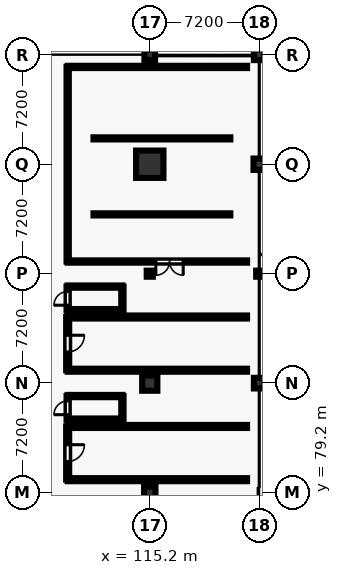
"""IFC4 building model, lengths in metres.
Left out: names, types, materials, properties, quantities, classifications, styles, units other than length and angle.
Written with IfcOpenShell. Run it as: python <this file> out.ifc"""

import sys

from ifc_helpers import new_model, si_unit, direction, frame, frame_2d, origin, origin_2d, place, context, subcontext, project, spatial, rectangle, hollow_rectangle, circle, extrude, element, fill, save


model = new_model("IFC4")
c1 = context("Model", 3, precision=1e-05, world=origin(), true_north=direction((0.0, 1.0)))
c2 = subcontext(c1, "Body", "Model", "MODEL_VIEW")
j1 = project(units=[si_unit("LENGTHUNIT", "METRE"), si_unit("PLANEANGLEUNIT", "RADIAN")], contexts=[c1])
p1 = place(None, origin())
s1 = spatial("IfcSite", under=j1, at=p1, CompositionType="ELEMENT")
p2 = place(p1, origin())
s2 = spatial("IfcBuilding", under=s1, at=p2, CompositionType="ELEMENT")
p3 = place(p2, frame((0.0, 0.0, 9.6)))
s3 = spatial("IfcBuildingStorey", under=s2, at=p3, CompositionType="ELEMENT", Elevation=9.6)
p4 = place(p3, frame((115.2, 79.2, 0.0), z_axis=(0.0, 0.0, 1.0), x_axis=(1.0, 0.0, 0.0)))
e1 = element("IfcColumn", 1, at=p4, inside=s3, PredefinedType="COLUMN", context=c2, shape_type="SweptSolid", body=[
    extrude(rectangle(XDim=0.75, YDim=0.75, at=origin_2d()), origin(), (0.0, 0.0, 1.0), 4.2),
])
p5 = place(p3, frame((115.2, 86.4, 0.0), z_axis=(0.0, 0.0, 1.0), x_axis=(1.0, 0.0, 0.0)))
e2 = element("IfcColumn", 2, at=p5, inside=s3, PredefinedType="COLUMN", context=c2, shape_type="SweptSolid", body=[
    extrude(circle(Radius=0.5, at=origin_2d()), origin(), (0.0, 0.0, 1.0), 4.2),
])
p6 = place(p3, frame((115.2, 93.6, 0.0), z_axis=(0.0, 0.0, 1.0), x_axis=(1.0, 0.0, 0.0)))
e3 = element("IfcColumn", 3, at=p6, inside=s3, PredefinedType="COLUMN", context=c2, shape_type="SweptSolid", body=[
    extrude(hollow_rectangle(XDim=0.4, YDim=0.4, WallThickness=0.02, at=origin_2d()), origin(), (0.0, 0.0, 1.0), 4.2),
])
p7 = place(p3, frame((115.2, 100.8, 0.0), z_axis=(0.0, 0.0, 1.0), x_axis=(1.0, 0.0, 0.0)))
e4 = element("IfcColumn", 4, at=p7, inside=s3, PredefinedType="COLUMN", context=c2, shape_type="SweptSolid", body=[
    extrude(circle(Radius=0.9, at=origin_2d()), origin(), (0.0, 0.0, 1.0), 4.2),
])
for number, where, z_axis, x_axis in (
    (5, (115.2, 108.0, 0.0), (0.0, 0.0, 1.0), (1.0, 0.0, 0.0)),
    (6, (122.4, 86.4, 0.0), (0.0, 0.0, 1.0), (1.0, 0.0, 0.0)),
):
    element("IfcColumn", number, at=place(p3, frame(where, z_axis=z_axis, x_axis=x_axis)), inside=s3, PredefinedType="COLUMN", context=c2, shape_type="SweptSolid", body=[
        extrude(rectangle(XDim=0.7, YDim=0.7, at=origin_2d()), origin(), (0.0, 0.0, 1.0), 4.2),
    ])
p8 = place(p3, frame((122.4, 93.6, 0.0), z_axis=(0.0, 0.0, 1.0), x_axis=(1.0, 0.0, 0.0)))
e7 = element("IfcColumn", 7, at=p8, inside=s3, PredefinedType="COLUMN", context=c2, shape_type="SweptSolid", body=[
    extrude(hollow_rectangle(XDim=0.4, YDim=0.4, WallThickness=0.02, at=origin_2d()), origin(), (0.0, 0.0, 1.0), 4.2),
])
p9 = place(p3, frame((122.4, 100.8, 0.0), z_axis=(0.0, 0.0, 1.0), x_axis=(1.0, 0.0, 0.0)))
e8 = element("IfcColumn", 8, at=p9, inside=s3, PredefinedType="COLUMN", context=c2, shape_type="SweptSolid", body=[
    extrude(rectangle(XDim=0.75, YDim=0.75, at=origin_2d()), origin(), (0.0, 0.0, 1.0), 4.2),
])
p10 = place(p3, frame((122.4, 108.0, 0.0), z_axis=(0.0, 0.0, 1.0), x_axis=(1.0, 0.0, 0.0)))
e9 = element("IfcColumn", 9, at=p10, inside=s3, PredefinedType="COLUMN", context=c2, shape_type="SweptSolid", body=[
    extrude(rectangle(XDim=0.7, YDim=0.7, at=origin_2d()), origin(), (0.0, 0.0, 1.0), 4.2),
])
p11 = place(p3, frame((109.8, 94.4, 0.0), z_axis=(0.0, 0.0, 1.0), x_axis=(1.0, 0.0, 0.0)))
e10 = element("IfcWall", 10, at=p11, inside=s3, PredefinedType="PARTITIONING", context=c2, shape_type="SweptSolid", body=[
    extrude(rectangle(XDim=11.8, YDim=0.15, at=frame_2d((5.9, 0.0))), origin(), (0.0, 0.0, 1.0), 2.94),
])
p12 = place(p11, frame((5.8, 0.0, 0.0)))
e11 = element("IfcOpeningElement", 11, at=p12, cuts=e10, PredefinedType="OPENING", context=c2, shape_type="SweptSolid", body=[
    extrude(rectangle(XDim=1.8, YDim=2.3, at=frame_2d((0.9, 1.15))), frame((0.0, 0.085, 0.0), z_axis=(0.0, -1.0, 0.0), x_axis=(1.0, 0.0, 0.0)), (0.0, 0.0, 1.0), 0.17),
])
p13 = place(p3, frame((121.6, 107.2, 0.0), z_axis=(0.0, 0.0, 1.0), x_axis=(-1.0, 0.0, 0.0)))
e12 = element("IfcWall", 12, at=p13, inside=s3, PredefinedType="PARTITIONING", context=c2, shape_type="SweptSolid", body=[
    extrude(rectangle(XDim=11.8, YDim=0.15, at=frame_2d((5.9, 0.0))), origin(), (0.0, 0.0, 1.0), 2.94),
])
p14 = place(p3, frame((109.8, 107.2, 0.0), z_axis=(0.0, 0.0, 1.0), x_axis=(0.0, -1.0, 0.0)))
e13 = element("IfcWall", 13, at=p14, inside=s3, PredefinedType="PARTITIONING", context=c2, shape_type="SweptSolid", body=[
    extrude(rectangle(XDim=12.8, YDim=0.15, at=frame_2d((6.4, 0.0))), origin(), (0.0, 0.0, 1.0), 2.94),
])
for number, where, z_axis, x_axis in (
    (14, (109.8, 80.05, 0.0), (0.0, 0.0, 1.0), (1.0, 0.0, 0.0)),
    (15, (121.6, 83.55, 0.0), (0.0, 0.0, 1.0), (-1.0, 0.0, 0.0)),
):
    element("IfcWall", number, at=place(p3, frame(where, z_axis=z_axis, x_axis=x_axis)), inside=s3, PredefinedType="PARTITIONING", context=c2, shape_type="SweptSolid", body=[
        extrude(rectangle(XDim=11.8, YDim=0.2, at=frame_2d((5.9, 0.0))), origin(), (0.0, 0.0, 1.0), 2.94),
    ])
p15 = place(p3, frame((109.8, 83.55, 0.0), z_axis=(0.0, 0.0, 1.0), x_axis=(0.0, -1.0, 0.0)))
e16 = element("IfcWall", 16, at=p15, inside=s3, PredefinedType="PARTITIONING", context=c2, shape_type="SweptSolid", body=[
    extrude(rectangle(XDim=3.5, YDim=0.2, at=frame_2d((1.75, 0.0))), origin(), (0.0, 0.0, 1.0), 2.94),
])
p16 = place(p15, frame((1.2, 0.0, 0.0)))
e17 = element("IfcOpeningElement", 17, at=p16, cuts=e16, PredefinedType="OPENING", context=c2, shape_type="SweptSolid", body=[
    extrude(rectangle(XDim=1.1, YDim=2.25, at=frame_2d((0.55, 1.125))), frame((0.0, 0.11, 0.0), z_axis=(0.0, -1.0, 0.0), x_axis=(1.0, 0.0, 0.0)), (0.0, 0.0, 1.0), 0.22),
])
p17 = place(p3, frame((109.8, 84.0, 0.0), z_axis=(0.0, 0.0, 1.0), x_axis=(1.0, 0.0, 0.0)))
e18 = element("IfcWall", 18, at=p17, inside=s3, PredefinedType="PARTITIONING", context=c2, shape_type="SweptSolid", body=[
    extrude(rectangle(XDim=3.6, YDim=0.15, at=frame_2d((1.8, 0.0))), origin(), (0.0, 0.0, 1.0), 2.94),
])
p18 = place(p3, frame((113.4, 84.0, 0.0), z_axis=(0.0, 0.0, 1.0), x_axis=(0.0, 1.0, 0.0)))
e19 = element("IfcWall", 19, at=p18, inside=s3, PredefinedType="PARTITIONING", context=c2, shape_type="SweptSolid", body=[
    extrude(rectangle(XDim=1.55, YDim=0.15, at=frame_2d((0.775, 0.0))), origin(), (0.0, 0.0, 1.0), 2.94),
])
p19 = place(p3, frame((113.4, 85.55, 0.0), z_axis=(0.0, 0.0, 1.0), x_axis=(-1.0, 0.0, 0.0)))
e20 = element("IfcWall", 20, at=p19, inside=s3, PredefinedType="PARTITIONING", context=c2, shape_type="SweptSolid", body=[
    extrude(rectangle(XDim=3.6, YDim=0.15, at=frame_2d((1.8, 0.0))), origin(), (0.0, 0.0, 1.0), 2.94),
])
p20 = place(p3, frame((109.8, 85.55, 0.0), z_axis=(0.0, 0.0, 1.0), x_axis=(0.0, -1.0, 0.0)))
e21 = element("IfcWall", 21, at=p20, inside=s3, PredefinedType="PARTITIONING", context=c2, shape_type="SweptSolid", body=[
    extrude(rectangle(XDim=1.55, YDim=0.15, at=frame_2d((0.775, 0.0))), origin(), (0.0, 0.0, 1.0), 2.94),
])
p21 = place(p20, frame((0.325, 0.0, 0.0)))
e22 = element("IfcOpeningElement", 22, at=p21, cuts=e21, PredefinedType="OPENING", context=c2, shape_type="SweptSolid", body=[
    extrude(rectangle(XDim=0.9, YDim=2.15, at=frame_2d((0.45, 1.075))), frame((0.0, 0.085, 0.0), z_axis=(0.0, -1.0, 0.0), x_axis=(1.0, 0.0, 0.0)), (0.0, 0.0, 1.0), 0.17),
])
for number, where, z_axis, x_axis in (
    (23, (109.8, 87.25, 0.0), (0.0, 0.0, 1.0), (1.0, 0.0, 0.0)),
    (24, (121.6, 90.75, 0.0), (0.0, 0.0, 1.0), (-1.0, 0.0, 0.0)),
):
    element("IfcWall", number, at=place(p3, frame(where, z_axis=z_axis, x_axis=x_axis)), inside=s3, PredefinedType="PARTITIONING", context=c2, shape_type="SweptSolid", body=[
        extrude(rectangle(XDim=11.8, YDim=0.2, at=frame_2d((5.9, 0.0))), origin(), (0.0, 0.0, 1.0), 2.94),
    ])
p22 = place(p3, frame((109.8, 90.75, 0.0), z_axis=(0.0, 0.0, 1.0), x_axis=(0.0, -1.0, 0.0)))
e25 = element("IfcWall", 25, at=p22, inside=s3, PredefinedType="PARTITIONING", context=c2, shape_type="SweptSolid", body=[
    extrude(rectangle(XDim=3.5, YDim=0.2, at=frame_2d((1.75, 0.0))), origin(), (0.0, 0.0, 1.0), 2.94),
])
p23 = place(p22, frame((1.2, 0.0, 0.0)))
e26 = element("IfcOpeningElement", 26, at=p23, cuts=e25, PredefinedType="OPENING", context=c2, shape_type="SweptSolid", body=[
    extrude(rectangle(XDim=1.1, YDim=2.25, at=frame_2d((0.55, 1.125))), frame((0.0, 0.11, 0.0), z_axis=(0.0, -1.0, 0.0), x_axis=(1.0, 0.0, 0.0)), (0.0, 0.0, 1.0), 0.22),
])
p24 = place(p3, frame((109.8, 91.2, 0.0), z_axis=(0.0, 0.0, 1.0), x_axis=(1.0, 0.0, 0.0)))
e27 = element("IfcWall", 27, at=p24, inside=s3, PredefinedType="PARTITIONING", context=c2, shape_type="SweptSolid", body=[
    extrude(rectangle(XDim=3.6, YDim=0.15, at=frame_2d((1.8, 0.0))), origin(), (0.0, 0.0, 1.0), 2.94),
])
p25 = place(p3, frame((113.4, 91.2, 0.0), z_axis=(0.0, 0.0, 1.0), x_axis=(0.0, 1.0, 0.0)))
e28 = element("IfcWall", 28, at=p25, inside=s3, PredefinedType="PARTITIONING", context=c2, shape_type="SweptSolid", body=[
    extrude(rectangle(XDim=1.55, YDim=0.15, at=frame_2d((0.775, 0.0))), origin(), (0.0, 0.0, 1.0), 2.94),
])
p26 = place(p3, frame((113.4, 92.75, 0.0), z_axis=(0.0, 0.0, 1.0), x_axis=(-1.0, 0.0, 0.0)))
e29 = element("IfcWall", 29, at=p26, inside=s3, PredefinedType="PARTITIONING", context=c2, shape_type="SweptSolid", body=[
    extrude(rectangle(XDim=3.6, YDim=0.15, at=frame_2d((1.8, 0.0))), origin(), (0.0, 0.0, 1.0), 2.94),
])
p27 = place(p3, frame((109.8, 92.75, 0.0), z_axis=(0.0, 0.0, 1.0), x_axis=(0.0, -1.0, 0.0)))
e30 = element("IfcWall", 30, at=p27, inside=s3, PredefinedType="PARTITIONING", context=c2, shape_type="SweptSolid", body=[
    extrude(rectangle(XDim=1.55, YDim=0.15, at=frame_2d((0.775, 0.0))), origin(), (0.0, 0.0, 1.0), 2.94),
])
p28 = place(p27, frame((0.325, 0.0, 0.0)))
e31 = element("IfcOpeningElement", 31, at=p28, cuts=e30, PredefinedType="OPENING", context=c2, shape_type="SweptSolid", body=[
    extrude(rectangle(XDim=0.9, YDim=2.15, at=frame_2d((0.45, 1.075))), frame((0.0, 0.085, 0.0), z_axis=(0.0, -1.0, 0.0), x_axis=(1.0, 0.0, 0.0)), (0.0, 0.0, 1.0), 0.17),
])
for number, where, z_axis, x_axis in (
    (32, (111.5, 97.5, 0.0), (0.0, 0.0, 1.0), (1.0, 0.0, 0.0)),
    (33, (111.5, 102.5, 0.0), (0.0, 0.0, 1.0), (1.0, 0.0, 0.0)),
):
    element("IfcWall", number, at=place(p3, frame(where, z_axis=z_axis, x_axis=x_axis)), inside=s3, PredefinedType="MOVABLE", context=c2, shape_type="SweptSolid", body=[
        extrude(rectangle(XDim=9.0, YDim=0.14, at=frame_2d((4.5, 0.0))), origin(), (0.0, 0.0, 1.0), 2.93),
    ])
p29 = place(p12, frame((1.8, 0.0, 0.0), z_axis=(0.0, 0.0, 1.0), x_axis=(-1.0, 0.0, 0.0)))
e34 = element("IfcDoor", 34, at=p29, inside=s3, OperationType="DOUBLE_DOOR_SINGLE_SWING", PredefinedType="DOOR", context=c2, shape_type="SweptSolid", body=[
    extrude(rectangle(XDim=1.8, YDim=2.3, at=frame_2d((0.9, 1.15))), frame((0.0, 0.025, 0.0), z_axis=(0.0, -1.0, 0.0), x_axis=(1.0, 0.0, 0.0)), (0.0, 0.0, 1.0), 0.05),
])
fill(e11, e34)
p30 = place(p16, origin())
e35 = element("IfcDoor", 35, at=p30, inside=s3, OperationType="SINGLE_SWING_LEFT", PredefinedType="DOOR", context=c2, shape_type="SweptSolid", body=[
    extrude(rectangle(XDim=1.1, YDim=2.25, at=frame_2d((0.55, 1.125))), frame((0.0, 0.025, 0.0), z_axis=(0.0, -1.0, 0.0), x_axis=(1.0, 0.0, 0.0)), (0.0, 0.0, 1.0), 0.05),
])
fill(e17, e35)
p31 = place(p21, frame((0.9, 0.0, 0.0), z_axis=(0.0, 0.0, 1.0), x_axis=(-1.0, 0.0, 0.0)))
e36 = element("IfcDoor", 36, at=p31, inside=s3, OperationType="SINGLE_SWING_RIGHT", PredefinedType="DOOR", context=c2, shape_type="SweptSolid", body=[
    extrude(rectangle(XDim=0.9, YDim=2.15, at=frame_2d((0.45, 1.075))), frame((0.0, 0.025, 0.0), z_axis=(0.0, -1.0, 0.0), x_axis=(1.0, 0.0, 0.0)), (0.0, 0.0, 1.0), 0.05),
])
fill(e22, e36)
p32 = place(p23, origin())
e37 = element("IfcDoor", 37, at=p32, inside=s3, OperationType="SINGLE_SWING_LEFT", PredefinedType="DOOR", context=c2, shape_type="SweptSolid", body=[
    extrude(rectangle(XDim=1.1, YDim=2.25, at=frame_2d((0.55, 1.125))), frame((0.0, 0.025, 0.0), z_axis=(0.0, -1.0, 0.0), x_axis=(1.0, 0.0, 0.0)), (0.0, 0.0, 1.0), 0.05),
])
fill(e26, e37)
p33 = place(p28, frame((0.9, 0.0, 0.0), z_axis=(0.0, 0.0, 1.0), x_axis=(-1.0, 0.0, 0.0)))
e38 = element("IfcDoor", 38, at=p33, inside=s3, OperationType="SINGLE_SWING_RIGHT", PredefinedType="DOOR", context=c2, shape_type="SweptSolid", body=[
    extrude(rectangle(XDim=0.9, YDim=2.15, at=frame_2d((0.45, 1.075))), frame((0.0, 0.025, 0.0), z_axis=(0.0, -1.0, 0.0), x_axis=(1.0, 0.0, 0.0)), (0.0, 0.0, 1.0), 0.05),
])
fill(e31, e38)
save(model, sys.argv[1])
